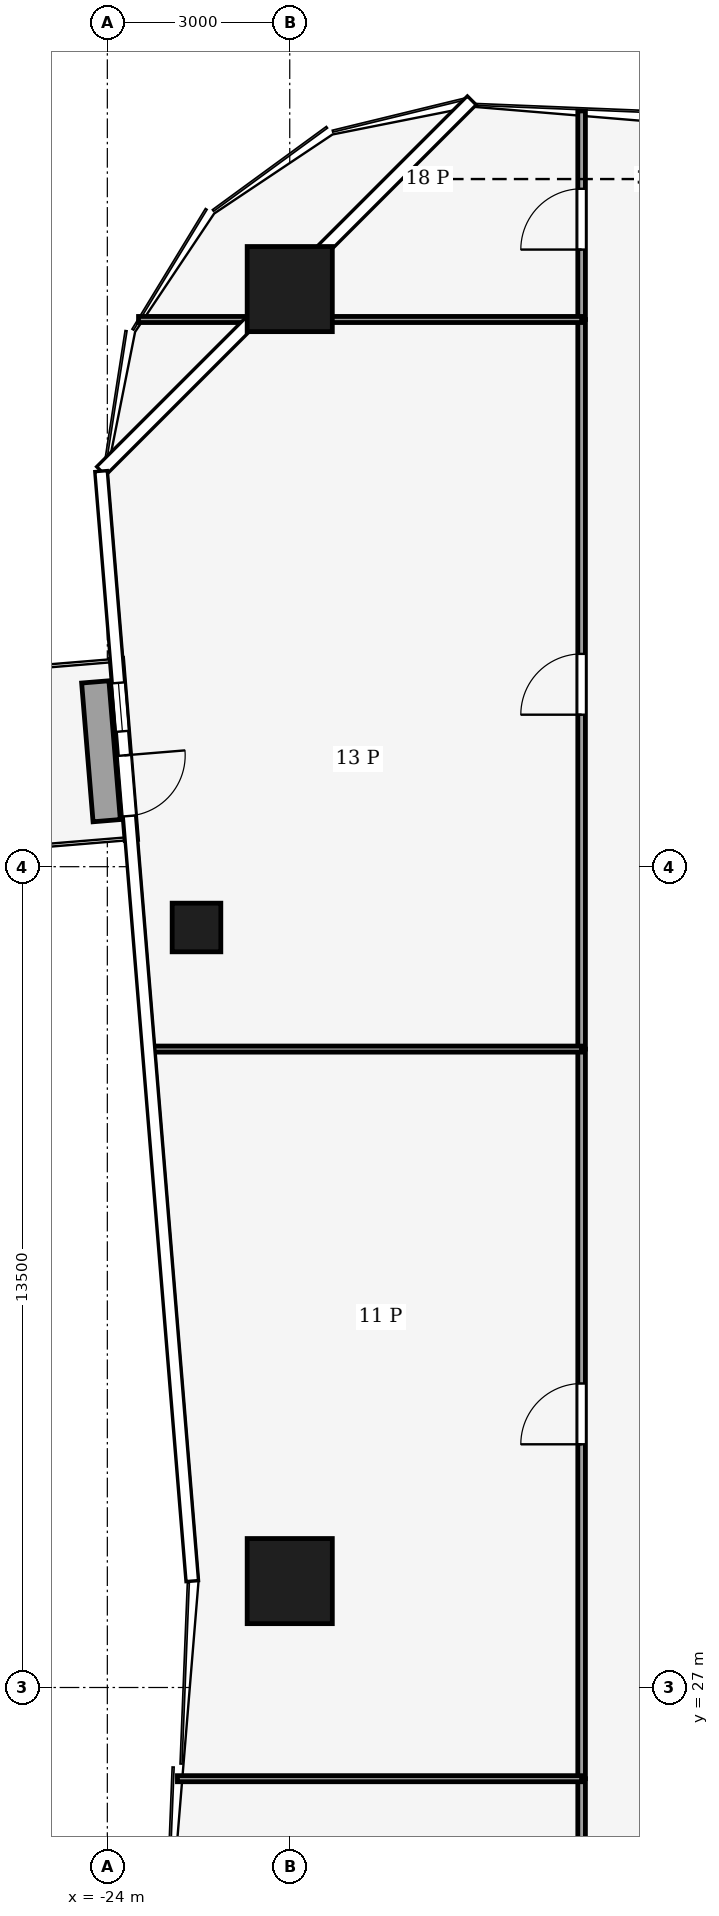
"""IFC4 building model, lengths in metres.
Left out: names, types, materials, properties, quantities, classifications, styles, units other than length and angle.
Written with IfcOpenShell. Run it as: python <this file> out.ifc"""

import sys

from ifc_helpers import new_model, si_unit, direction, frame, frame_2d, origin, origin_2d, place, context, subcontext, project, spatial, rectangle, hollow_rectangle, extrude, element, fill, save


model = new_model("IFC4")
c1 = context("Model", 3, precision=1e-05, world=origin(), true_north=direction((0.0, 1.0)))
c2 = subcontext(c1, "Body", "Model", "MODEL_VIEW")
j1 = project(units=[si_unit("LENGTHUNIT", "METRE"), si_unit("PLANEANGLEUNIT", "RADIAN")], contexts=[c1])
p1 = place(None, origin())
s1 = spatial("IfcSite", under=j1, at=p1, CompositionType="ELEMENT")
p2 = place(p1, origin())
s2 = spatial("IfcBuilding", under=s1, at=p2, CompositionType="ELEMENT")
p3 = place(p2, frame((0.0, 0.0, 90.0)))
s3 = spatial("IfcBuildingStorey", under=s2, at=p3, CompositionType="ELEMENT", Elevation=90.0)
for number, where, z_axis, x_axis in (
    (1, (-21.0, 50.0, 0.0), (0.0, 0.0, 1.0), (1.0, 0.0, 0.0)),
    (2, (-21.0, 28.75, 0.0), (0.0, 0.0, 1.0), (1.0, 0.0, 0.0)),
):
    element("IfcColumn", number, at=place(p3, frame(where, z_axis=z_axis, x_axis=x_axis)), inside=s3, PredefinedType="COLUMN", context=c2, shape_type="SweptSolid", body=[
        extrude(hollow_rectangle(XDim=1.4, YDim=1.4, WallThickness=0.08, at=origin_2d()), origin(), (0.0, 0.0, 1.0), 4.0),
    ])
p4 = place(p3, frame((-22.534, 39.5, 0.0), z_axis=(0.0, 0.0, 1.0), x_axis=(1.0, 0.0, 0.0)))
e3 = element("IfcColumn", 3, at=p4, inside=s3, PredefinedType="COLUMN", context=c2, shape_type="SweptSolid", body=[
    extrude(hollow_rectangle(XDim=0.8, YDim=0.8, WallThickness=0.04, at=origin_2d()), origin(), (0.0, 0.0, 1.0), 4.0),
])
p5 = place(p3, frame((-23.85, 43.919, 0.0), z_axis=(0.0, 0.0, 1.0), x_axis=(0.081903334605, -0.996640278024, 0.0)))
e4 = element("IfcWall", 4, at=p5, inside=s3, PredefinedType="SOLIDWALL", context=c2, shape_type="SweptSolid", body=[
    extrude(rectangle(XDim=2.99, YDim=0.206, at=frame_2d((1.495, 0.0))), origin(), (0.0, 0.0, 1.0), 3.65),
])
p6 = place(p5, frame((1.593, 0.0, 0.0)))
e5 = element("IfcOpeningElement", 5, at=p6, cuts=e4, PredefinedType="OPENING", context=c2, shape_type="SweptSolid", body=[
    extrude(rectangle(XDim=1.0, YDim=2.1, at=frame_2d((0.5, 1.05))), frame((0.0, 0.113, 0.0), z_axis=(0.0, -1.0, 0.0), x_axis=(1.0, 0.0, 0.0)), (0.0, 0.0, 1.0), 0.226),
])
p7 = place(p5, frame((0.396, 0.0, 0.9)))
e6 = element("IfcOpeningElement", 6, at=p7, cuts=e4, PredefinedType="OPENING", context=c2, shape_type="SweptSolid", body=[
    extrude(rectangle(XDim=0.8, YDim=1.2, at=frame_2d((0.4, 0.6))), frame((0.0, 0.113, 0.0), z_axis=(0.0, -1.0, 0.0), x_axis=(1.0, 0.0, 0.0)), (0.0, 0.0, 1.0), 0.226),
])
p8 = place(p3, frame((-24.198, 43.539, 0.0), z_axis=(0.0, 0.0, 1.0), x_axis=(0.081986639556, -0.996633428566, 0.0)))
e7 = element("IfcWall", 7, at=p8, inside=s3, PredefinedType="USERDEFINED", context=c2, shape_type="SweptSolid", body=[
    extrude(rectangle(XDim=2.29, YDim=0.45, at=frame_2d((1.145, 0.0))), origin(), (0.0, 0.0, 1.0), 0.4),
])
p9 = place(p3, frame((-16.2, 16.5, 0.0), z_axis=(0.0, 0.0, 1.0), x_axis=(0.0, 1.0, 0.0)))
e8 = element("IfcWall", 8, at=p9, inside=s3, PredefinedType="PARTITIONING", context=c2, shape_type="SweptSolid", body=[
    extrude(rectangle(XDim=9.0, YDim=0.125, at=frame_2d((4.5, 0.0))), origin(), (0.0, 0.0, 1.0), 3.14),
])
p10 = place(p9, frame((4.0, 0.0, 0.0)))
e9 = element("IfcOpeningElement", 9, at=p10, cuts=e8, PredefinedType="OPENING", context=c2, shape_type="SweptSolid", body=[
    extrude(rectangle(XDim=1.0, YDim=2.1, at=frame_2d((0.5, 1.05))), frame((0.0, 0.073, 0.0), z_axis=(0.0, -1.0, 0.0), x_axis=(1.0, 0.0, 0.0)), (0.0, 0.0, 1.0), 0.145),
])
p11 = place(p3, frame((-16.2, 25.5, 0.0), z_axis=(0.0, 0.0, 1.0), x_axis=(0.0, 1.0, 0.0)))
e10 = element("IfcWall", 10, at=p11, inside=s3, PredefinedType="PARTITIONING", context=c2, shape_type="SweptSolid", body=[
    extrude(rectangle(XDim=12.0, YDim=0.125, at=frame_2d((6.0, 0.0))), origin(), (0.0, 0.0, 1.0), 3.48),
])
p12 = place(p11, frame((5.5, 0.0, 0.0)))
e11 = element("IfcOpeningElement", 11, at=p12, cuts=e10, PredefinedType="OPENING", context=c2, shape_type="SweptSolid", body=[
    extrude(rectangle(XDim=1.0, YDim=2.1, at=frame_2d((0.5, 1.05))), frame((0.0, 0.073, 0.0), z_axis=(0.0, -1.0, 0.0), x_axis=(1.0, 0.0, 0.0)), (0.0, 0.0, 1.0), 0.145),
])
p13 = place(p3, frame((-16.2, 37.5, 0.0), z_axis=(0.0, 0.0, 1.0), x_axis=(0.0, 1.0, 0.0)))
e12 = element("IfcWall", 12, at=p13, inside=s3, PredefinedType="PARTITIONING", context=c2, shape_type="SweptSolid", body=[
    extrude(rectangle(XDim=12.0, YDim=0.125, at=frame_2d((6.0, 0.0))), origin(), (0.0, 0.0, 1.0), 3.14),
])
p14 = place(p13, frame((5.5, 0.0, 0.0)))
e13 = element("IfcOpeningElement", 13, at=p14, cuts=e12, PredefinedType="OPENING", context=c2, shape_type="SweptSolid", body=[
    extrude(rectangle(XDim=1.0, YDim=2.1, at=frame_2d((0.5, 1.05))), frame((0.0, 0.073, 0.0), z_axis=(0.0, -1.0, 0.0), x_axis=(1.0, 0.0, 0.0)), (0.0, 0.0, 1.0), 0.145),
])
p15 = place(p3, frame((-16.2, 49.5, 0.0), z_axis=(0.0, 0.0, 1.0), x_axis=(0.0, 1.0, 0.0)))
e14 = element("IfcWall", 14, at=p15, inside=s3, PredefinedType="PARTITIONING", context=c2, shape_type="SweptSolid", body=[
    extrude(rectangle(XDim=3.43, YDim=0.125, at=frame_2d((1.715, 0.0))), origin(), (0.0, 0.0, 1.0), 3.04),
])
p16 = place(p15, frame((1.15, 0.0, 0.0)))
e15 = element("IfcOpeningElement", 15, at=p16, cuts=e14, PredefinedType="OPENING", context=c2, shape_type="SweptSolid", body=[
    extrude(rectangle(XDim=1.0, YDim=2.1, at=frame_2d((0.5, 1.05))), frame((0.0, 0.073, 0.0), z_axis=(0.0, -1.0, 0.0), x_axis=(1.0, 0.0, 0.0)), (0.0, 0.0, 1.0), 0.145),
])
p17 = place(p3, frame((-16.2, 25.5, 0.0), z_axis=(0.0, 0.0, 1.0), x_axis=(-1.0, 0.0, 0.0)))
e16 = element("IfcWall", 16, at=p17, inside=s3, PredefinedType="PARTITIONING", context=c2, shape_type="SweptSolid", body=[
    extrude(rectangle(XDim=6.647, YDim=0.1, at=frame_2d((3.324, 0.0))), origin(), (0.0, 0.0, 1.0), 3.04),
])
p18 = place(p3, frame((-16.2, 37.5, 0.0), z_axis=(0.0, 0.0, 1.0), x_axis=(-1.0, 0.0, 0.0)))
e17 = element("IfcWall", 17, at=p18, inside=s3, PredefinedType="PARTITIONING", context=c2, shape_type="SweptSolid", body=[
    extrude(rectangle(XDim=7.099, YDim=0.1, at=frame_2d((3.55, 0.0))), origin(), (0.0, 0.0, 1.0), 3.04),
])
p19 = place(p3, frame((-16.2, 49.5, 0.0), z_axis=(0.0, 0.0, 1.0), x_axis=(-1.0, 0.0, 0.0)))
e18 = element("IfcWall", 18, at=p19, inside=s3, PredefinedType="PARTITIONING", context=c2, shape_type="SweptSolid", body=[
    extrude(rectangle(XDim=7.287, YDim=0.1, at=frame_2d((3.644, 0.0))), origin(), (0.0, 0.0, 1.0), 3.34),
])
p20 = place(p6, origin())
e19 = element("IfcDoor", 19, at=p20, inside=s3, OperationType="SINGLE_SWING_RIGHT", PredefinedType="DOOR", context=c2, shape_type="SweptSolid", body=[
    extrude(rectangle(XDim=1.0, YDim=2.1, at=frame_2d((0.5, 1.05))), frame((0.0, 0.025, 0.0), z_axis=(0.0, -1.0, 0.0), x_axis=(1.0, 0.0, 0.0)), (0.0, 0.0, 1.0), 0.05),
])
fill(e5, e19)
p21 = place(p7, origin())
e20 = element("IfcWindow", 20, at=p21, inside=s3, PartitioningType="SINGLE_PANEL", PredefinedType="WINDOW", context=c2, shape_type="SweptSolid", body=[
    extrude(rectangle(XDim=0.8, YDim=1.2, at=frame_2d((0.4, 0.6))), frame((0.0, 0.03, 0.0), z_axis=(0.0, -1.0, 0.0), x_axis=(1.0, 0.0, 0.0)), (0.0, 0.0, 1.0), 0.06),
])
fill(e6, e20)
p22 = place(p12, origin())
e21 = element("IfcDoor", 21, at=p22, inside=s3, OperationType="SINGLE_SWING_RIGHT", PredefinedType="DOOR", context=c2, shape_type="SweptSolid", body=[
    extrude(rectangle(XDim=1.0, YDim=2.1, at=frame_2d((0.5, 1.05))), frame((0.0, 0.025, 0.0), z_axis=(0.0, -1.0, 0.0), x_axis=(1.0, 0.0, 0.0)), (0.0, 0.0, 1.0), 0.05),
])
fill(e11, e21)
p23 = place(p14, origin())
e22 = element("IfcDoor", 22, at=p23, inside=s3, OperationType="SINGLE_SWING_LEFT", PredefinedType="DOOR", context=c2, shape_type="SweptSolid", body=[
    extrude(rectangle(XDim=1.0, YDim=2.1, at=frame_2d((0.5, 1.05))), frame((0.0, 0.025, 0.0), z_axis=(0.0, -1.0, 0.0), x_axis=(1.0, 0.0, 0.0)), (0.0, 0.0, 1.0), 0.05),
])
fill(e13, e22)
p24 = place(p16, origin())
e23 = element("IfcDoor", 23, at=p24, inside=s3, OperationType="SINGLE_SWING_LEFT", PredefinedType="DOOR", context=c2, shape_type="SweptSolid", body=[
    extrude(rectangle(XDim=1.0, YDim=2.1, at=frame_2d((0.5, 1.05))), frame((0.0, 0.025, 0.0), z_axis=(0.0, -1.0, 0.0), x_axis=(1.0, 0.0, 0.0)), (0.0, 0.0, 1.0), 0.05),
])
fill(e15, e23)
save(model, sys.argv[1])
